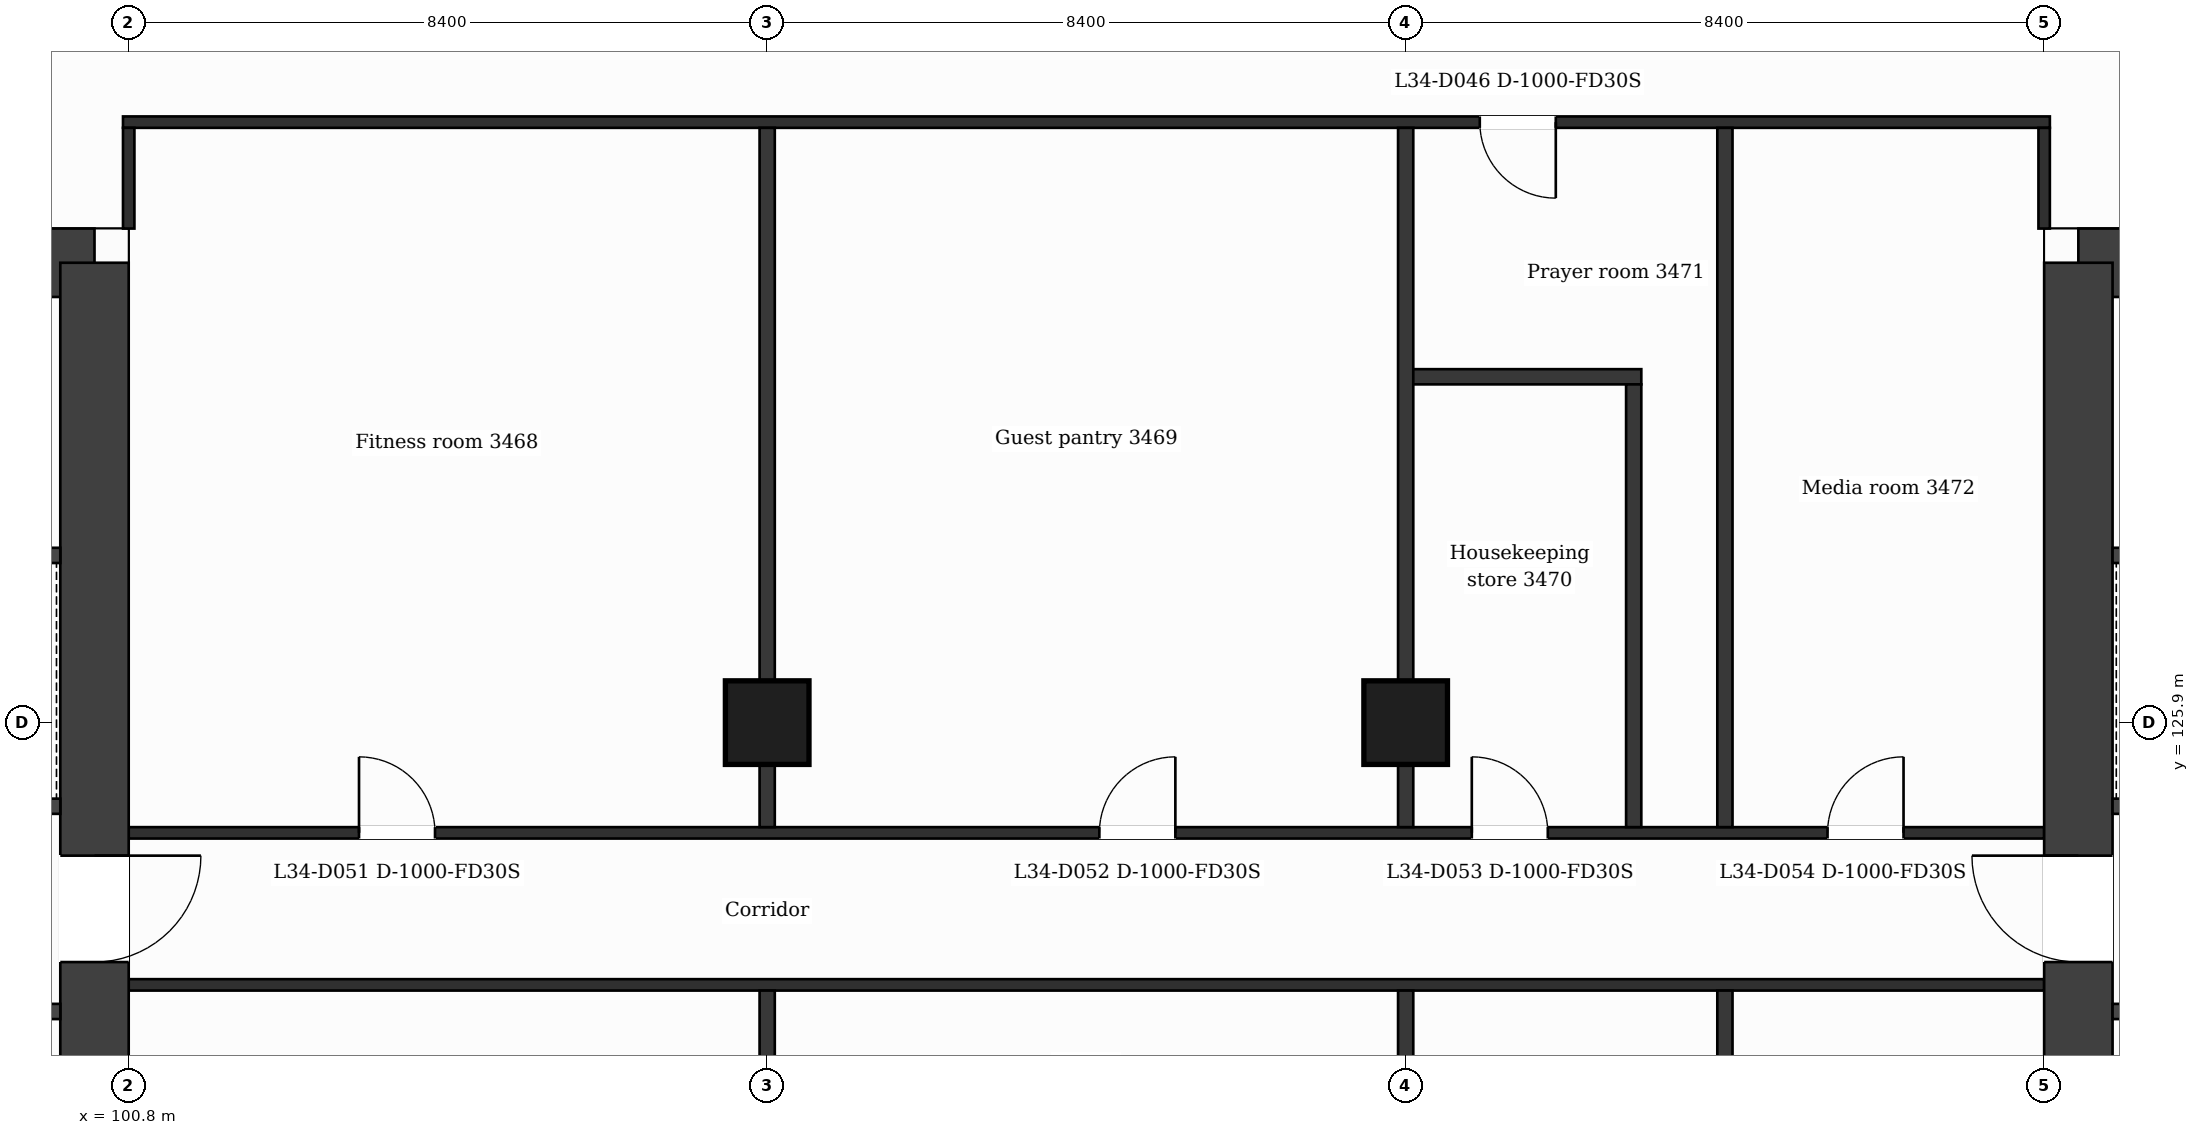
"""IFC4 building model, lengths in metres.
Left out: names, types, materials, properties, quantities, classifications, styles, units other than length and angle.
Written with IfcOpenShell. Run it as: python <this file> out.ifc"""

import sys

from ifc_helpers import new_model, si_unit, direction, frame, frame_2d, origin, origin_2d, place, context, subcontext, project, spatial, rectangle, extrude, element, fill, save


model = new_model("IFC4")
c1 = context("Model", 3, precision=1e-05, world=origin(), true_north=direction((0.0, 1.0)))
c2 = subcontext(c1, "Body", "Model", "MODEL_VIEW")
j1 = project(units=[si_unit("LENGTHUNIT", "METRE"), si_unit("PLANEANGLEUNIT", "RADIAN")], contexts=[c1])
p1 = place(None, origin())
s1 = spatial("IfcSite", under=j1, at=p1, CompositionType="ELEMENT")
p2 = place(p1, origin())
s2 = spatial("IfcBuilding", under=s1, at=p2, CompositionType="ELEMENT")
p3 = place(p2, frame((0.0, 0.0, 147.8)))
s3 = spatial("IfcBuildingStorey", under=s2, at=p3, CompositionType="ELEMENT", Elevation=147.8)
p4 = place(p3, frame((89.024, 131.95, 0.0), z_axis=(0.0, 0.0, 1.0), x_axis=(1.0, 0.0, 0.0)))
e1 = element("IfcWall", 1, at=p4, inside=s3, PredefinedType="SHEAR", context=c2, shape_type="SweptSolid", body=[
    extrude(rectangle(XDim=11.326, YDim=0.9, at=frame_2d((5.663, 0.0))), origin(), (0.0, 0.0, 1.0), 3.7),
])
p5 = place(p4, frame((6.739, 0.0, 0.0)))
e2 = element("IfcOpeningElement", 2, at=p5, cuts=e1, PredefinedType="OPENING", context=c2, shape_type="SweptSolid", body=[
    extrude(rectangle(XDim=1.2, YDim=2.1, at=frame_2d((0.6, 1.05))), frame((0.0, 0.46, 0.0), z_axis=(0.0, -1.0, 0.0), x_axis=(1.0, 0.0, 0.0)), (0.0, 0.0, 1.0), 0.92),
])
p6 = place(p3, frame((100.35, 131.95, 0.0), z_axis=(0.0, 0.0, 1.0), x_axis=(0.0, -1.0, 0.0)))
e3 = element("IfcWall", 3, at=p6, inside=s3, PredefinedType="SHEAR", context=c2, shape_type="SweptSolid", body=[
    extrude(rectangle(XDim=21.1, YDim=0.9, at=frame_2d((10.55, 0.0))), origin(), (0.0, 0.0, 1.0), 3.7),
])
p7 = place(p6, frame((7.8, 0.0, 0.0)))
e4 = element("IfcOpeningElement", 4, at=p7, cuts=e3, PredefinedType="OPENING", context=c2, shape_type="SweptSolid", body=[
    extrude(rectangle(XDim=1.4, YDim=2.1, at=frame_2d((0.7, 1.05))), frame((0.0, 0.46, 0.0), z_axis=(0.0, -1.0, 0.0), x_axis=(1.0, 0.0, 0.0)), (0.0, 0.0, 1.0), 0.92),
])
p8 = place(p3, frame((126.45, 131.95, 0.0), z_axis=(0.0, 0.0, 1.0), x_axis=(1.0, 0.0, 0.0)))
e5 = element("IfcWall", 5, at=p8, inside=s3, PredefinedType="SHEAR", context=c2, shape_type="SweptSolid", body=[
    extrude(rectangle(XDim=11.326, YDim=0.9, at=frame_2d((5.663, 0.0))), origin(), (0.0, 0.0, 1.0), 3.7),
])
p9 = place(p8, frame((3.386, 0.0, 0.0)))
e6 = element("IfcOpeningElement", 6, at=p9, cuts=e5, PredefinedType="OPENING", context=c2, shape_type="SweptSolid", body=[
    extrude(rectangle(XDim=1.2, YDim=2.1, at=frame_2d((0.6, 1.05))), frame((0.0, 0.46, 0.0), z_axis=(0.0, -1.0, 0.0), x_axis=(1.0, 0.0, 0.0)), (0.0, 0.0, 1.0), 0.92),
])
p10 = place(p3, frame((126.45, 110.85, 0.0), z_axis=(0.0, 0.0, 1.0), x_axis=(0.0, 1.0, 0.0)))
e7 = element("IfcWall", 7, at=p10, inside=s3, PredefinedType="SHEAR", context=c2, shape_type="SweptSolid", body=[
    extrude(rectangle(XDim=21.1, YDim=0.9, at=frame_2d((10.55, 0.0))), origin(), (0.0, 0.0, 1.0), 3.7),
])
p11 = place(p10, frame((11.9, 0.0, 0.0)))
e8 = element("IfcOpeningElement", 8, at=p11, cuts=e7, PredefinedType="OPENING", context=c2, shape_type="SweptSolid", body=[
    extrude(rectangle(XDim=1.4, YDim=2.1, at=frame_2d((0.7, 1.05))), frame((0.0, 0.46, 0.0), z_axis=(0.0, -1.0, 0.0), x_axis=(1.0, 0.0, 0.0)), (0.0, 0.0, 1.0), 0.92),
])
for number, where, z_axis, x_axis in (
    (9, (109.2, 125.9, 0.0), (0.0, 0.0, 1.0), (1.0, 0.0, 0.0)),
    (10, (117.6, 125.9, 0.0), (0.0, 0.0, 1.0), (1.0, 0.0, 0.0)),
):
    element("IfcColumn", number, at=place(p3, frame(where, z_axis=z_axis, x_axis=x_axis)), inside=s3, PredefinedType="COLUMN", context=c2, shape_type="SweptSolid", body=[
        extrude(rectangle(XDim=1.1, YDim=1.1, at=origin_2d()), origin(), (0.0, 0.0, 1.0), 3.7),
    ])
p12 = place(p3, frame((95.227, 122.1, 0.0), z_axis=(0.0, 0.0, 1.0), x_axis=(1.0, 0.0, 0.0)))
e11 = element("IfcWall", 11, at=p12, inside=s3, PredefinedType="PARTITIONING", context=c2, shape_type="SweptSolid", body=[
    extrude(rectangle(XDim=4.673, YDim=0.2, at=frame_2d((2.336, 0.0))), origin(), (0.0, 0.0, 1.0), 3.38),
])
p13 = place(p12, frame((0.718, 0.0, 0.0)))
e12 = element("IfcOpeningElement", 12, at=p13, cuts=e11, PredefinedType="OPENING", context=c2, shape_type="SweptSolid", body=[
    extrude(rectangle(XDim=0.9, YDim=2.1, at=frame_2d((0.45, 1.05))), frame((0.0, 0.11, 0.0), z_axis=(0.0, -1.0, 0.0), x_axis=(1.0, 0.0, 0.0)), (0.0, 0.0, 1.0), 0.22),
])
p14 = place(p12, frame((3.055, 0.0, 0.0)))
e13 = element("IfcOpeningElement", 13, at=p14, cuts=e11, PredefinedType="OPENING", context=c2, shape_type="SweptSolid", body=[
    extrude(rectangle(XDim=0.9, YDim=2.1, at=frame_2d((0.45, 1.05))), frame((0.0, 0.11, 0.0), z_axis=(0.0, -1.0, 0.0), x_axis=(1.0, 0.0, 0.0)), (0.0, 0.0, 1.0), 0.22),
])
p15 = place(p3, frame((126.9, 122.1, 0.0), z_axis=(0.0, 0.0, 1.0), x_axis=(1.0, 0.0, 0.0)))
e14 = element("IfcWall", 14, at=p15, inside=s3, PredefinedType="PARTITIONING", context=c2, shape_type="SweptSolid", body=[
    extrude(rectangle(XDim=4.673, YDim=0.2, at=frame_2d((2.336, 0.0))), origin(), (0.0, 0.0, 1.0), 3.38),
])
p16 = place(p15, frame((3.128, 0.0, 0.0)))
e15 = element("IfcOpeningElement", 15, at=p16, cuts=e14, PredefinedType="OPENING", context=c2, shape_type="SweptSolid", body=[
    extrude(rectangle(XDim=0.9, YDim=2.1, at=frame_2d((0.45, 1.05))), frame((0.0, 0.11, 0.0), z_axis=(0.0, -1.0, 0.0), x_axis=(1.0, 0.0, 0.0)), (0.0, 0.0, 1.0), 0.22),
])
p17 = place(p15, frame((0.902, 0.0, 0.0)))
e16 = element("IfcOpeningElement", 16, at=p17, cuts=e14, PredefinedType="OPENING", context=c2, shape_type="SweptSolid", body=[
    extrude(rectangle(XDim=0.9, YDim=2.1, at=frame_2d((0.45, 1.05))), frame((0.0, 0.11, 0.0), z_axis=(0.0, -1.0, 0.0), x_axis=(1.0, 0.0, 0.0)), (0.0, 0.0, 1.0), 0.22),
])
p18 = place(p3, frame((100.8, 122.45, 0.0), z_axis=(0.0, 0.0, 1.0), x_axis=(1.0, 0.0, 0.0)))
e17 = element("IfcWall", 17, at=p18, inside=s3, PredefinedType="PARTITIONING", context=c2, shape_type="SweptSolid", body=[
    extrude(rectangle(XDim=25.2, YDim=0.15, at=frame_2d((12.6, 0.0))), origin(), (0.0, 0.0, 1.0), 3.38),
])
p19 = place(p3, frame((100.8, 124.45, 0.0), z_axis=(0.0, 0.0, 1.0), x_axis=(1.0, 0.0, 0.0)))
e18 = element("IfcWall", 18, at=p19, inside=s3, PredefinedType="PARTITIONING", context=c2, shape_type="SweptSolid", body=[
    extrude(rectangle(XDim=25.2, YDim=0.15, at=frame_2d((12.6, 0.0))), origin(), (0.0, 0.0, 1.0), 3.38),
])
p20 = place(p19, frame((3.03, 0.0, 0.0)))
e19 = element("IfcOpeningElement", 19, at=p20, cuts=e18, PredefinedType="OPENING", context=c2, shape_type="SweptSolid", body=[
    extrude(rectangle(XDim=1.0, YDim=2.1, at=frame_2d((0.5, 1.05))), frame((0.0, 0.085, 0.0), z_axis=(0.0, -1.0, 0.0), x_axis=(1.0, 0.0, 0.0)), (0.0, 0.0, 1.0), 0.17),
])
p21 = place(p19, frame((12.77, 0.0, 0.0)))
e20 = element("IfcOpeningElement", 20, at=p21, cuts=e18, PredefinedType="OPENING", context=c2, shape_type="SweptSolid", body=[
    extrude(rectangle(XDim=1.0, YDim=2.1, at=frame_2d((0.5, 1.05))), frame((0.0, 0.085, 0.0), z_axis=(0.0, -1.0, 0.0), x_axis=(1.0, 0.0, 0.0)), (0.0, 0.0, 1.0), 0.17),
])
p22 = place(p19, frame((17.67, 0.0, 0.0)))
e21 = element("IfcOpeningElement", 21, at=p22, cuts=e18, PredefinedType="OPENING", context=c2, shape_type="SweptSolid", body=[
    extrude(rectangle(XDim=1.0, YDim=2.1, at=frame_2d((0.5, 1.05))), frame((0.0, 0.085, 0.0), z_axis=(0.0, -1.0, 0.0), x_axis=(1.0, 0.0, 0.0)), (0.0, 0.0, 1.0), 0.17),
])
p23 = place(p19, frame((22.35, 0.0, 0.0)))
e22 = element("IfcOpeningElement", 22, at=p23, cuts=e18, PredefinedType="OPENING", context=c2, shape_type="SweptSolid", body=[
    extrude(rectangle(XDim=1.0, YDim=2.1, at=frame_2d((0.5, 1.05))), frame((0.0, 0.085, 0.0), z_axis=(0.0, -1.0, 0.0), x_axis=(1.0, 0.0, 0.0)), (0.0, 0.0, 1.0), 0.17),
])
p24 = place(p3, frame((92.702, 124.8, 0.0), z_axis=(0.0, 0.0, 1.0), x_axis=(1.0, 0.0, 0.0)))
e23 = element("IfcWall", 23, at=p24, inside=s3, PredefinedType="PARTITIONING", context=c2, shape_type="SweptSolid", body=[
    extrude(rectangle(XDim=7.198, YDim=0.2, at=frame_2d((3.599, 0.0))), origin(), (0.0, 0.0, 1.0), 3.38),
])
p25 = place(p24, frame((5.609, 0.0, 0.0)))
e24 = element("IfcOpeningElement", 24, at=p25, cuts=e23, PredefinedType="OPENING", context=c2, shape_type="SweptSolid", body=[
    extrude(rectangle(XDim=1.1, YDim=2.1, at=frame_2d((0.55, 1.05))), frame((0.0, 0.11, 0.0), z_axis=(0.0, -1.0, 0.0), x_axis=(1.0, 0.0, 0.0)), (0.0, 0.0, 1.0), 0.22),
])
p26 = place(p3, frame((126.9, 124.8, 0.0), z_axis=(0.0, 0.0, 1.0), x_axis=(1.0, 0.0, 0.0)))
e25 = element("IfcWall", 25, at=p26, inside=s3, PredefinedType="PARTITIONING", context=c2, shape_type="SweptSolid", body=[
    extrude(rectangle(XDim=4.715, YDim=0.2, at=frame_2d((2.358, 0.0))), origin(), (0.0, 0.0, 1.0), 3.38),
])
p27 = place(p26, frame((0.768, 0.0, 0.0)))
e26 = element("IfcOpeningElement", 26, at=p27, cuts=e25, PredefinedType="OPENING", context=c2, shape_type="SweptSolid", body=[
    extrude(rectangle(XDim=1.1, YDim=2.1, at=frame_2d((0.55, 1.05))), frame((0.0, 0.11, 0.0), z_axis=(0.0, -1.0, 0.0), x_axis=(1.0, 0.0, 0.0)), (0.0, 0.0, 1.0), 0.22),
])
p28 = place(p3, frame((92.827, 128.1, 0.0), z_axis=(0.0, 0.0, 1.0), x_axis=(1.0, 0.0, 0.0)))
e27 = element("IfcWall", 27, at=p28, inside=s3, PredefinedType="PARTITIONING", context=c2, shape_type="SweptSolid", body=[
    extrude(rectangle(XDim=7.073, YDim=0.2, at=frame_2d((3.537, 0.0))), origin(), (0.0, 0.0, 1.0), 3.38),
])
p29 = place(p28, frame((3.042, 0.0, 0.0)))
e28 = element("IfcOpeningElement", 28, at=p29, cuts=e27, PredefinedType="OPENING", context=c2, shape_type="SweptSolid", body=[
    extrude(rectangle(XDim=1.1, YDim=2.1, at=frame_2d((0.55, 1.05))), frame((0.0, 0.11, 0.0), z_axis=(0.0, -1.0, 0.0), x_axis=(1.0, 0.0, 0.0)), (0.0, 0.0, 1.0), 0.22),
])
p30 = place(p3, frame((126.9, 128.1, 0.0), z_axis=(0.0, 0.0, 1.0), x_axis=(1.0, 0.0, 0.0)))
e29 = element("IfcWall", 29, at=p30, inside=s3, PredefinedType="PARTITIONING", context=c2, shape_type="SweptSolid", body=[
    extrude(rectangle(XDim=4.715, YDim=0.2, at=frame_2d((2.358, 0.0))), origin(), (0.0, 0.0, 1.0), 3.38),
])
p31 = place(p30, frame((3.126, 0.0, 0.0)))
e30 = element("IfcOpeningElement", 30, at=p31, cuts=e29, PredefinedType="OPENING", context=c2, shape_type="SweptSolid", body=[
    extrude(rectangle(XDim=1.1, YDim=2.1, at=frame_2d((0.55, 1.05))), frame((0.0, 0.11, 0.0), z_axis=(0.0, -1.0, 0.0), x_axis=(1.0, 0.0, 0.0)), (0.0, 0.0, 1.0), 0.22),
])
p32 = place(p3, frame((117.6, 130.45, 0.0), z_axis=(0.0, 0.0, 1.0), x_axis=(1.0, 0.0, 0.0)))
e31 = element("IfcWall", 31, at=p32, inside=s3, PredefinedType="PARTITIONING", context=c2, shape_type="SweptSolid", body=[
    extrude(rectangle(XDim=3.1, YDim=0.2, at=frame_2d((1.55, 0.0))), origin(), (0.0, 0.0, 1.0), 3.38),
])
p33 = place(p3, frame((100.725, 133.8, 0.0), z_axis=(0.0, 0.0, 1.0), x_axis=(1.0, 0.0, 0.0)))
e32 = element("IfcWall", 32, at=p33, inside=s3, PredefinedType="PARTITIONING", context=c2, shape_type="SweptSolid", body=[
    extrude(rectangle(XDim=25.35, YDim=0.15, at=frame_2d((12.675, 0.0))), origin(), (0.0, 0.0, 1.0), 3.38),
])
p34 = place(p33, frame((17.85, 0.0, 0.0)))
e33 = element("IfcOpeningElement", 33, at=p34, cuts=e32, PredefinedType="OPENING", context=c2, shape_type="SweptSolid", body=[
    extrude(rectangle(XDim=1.0, YDim=2.1, at=frame_2d((0.5, 1.05))), frame((0.0, 0.085, 0.0), z_axis=(0.0, -1.0, 0.0), x_axis=(1.0, 0.0, 0.0)), (0.0, 0.0, 1.0), 0.17),
])
p35 = place(p3, frame((100.8, 132.4, 0.0), z_axis=(0.0, 0.0, 1.0), x_axis=(0.0, 1.0, 0.0)))
e34 = element("IfcWall", 34, at=p35, inside=s3, PredefinedType="PARTITIONING", context=c2, shape_type="SweptSolid", body=[
    extrude(rectangle(XDim=1.325, YDim=0.15, at=frame_2d((0.663, 0.0))), origin(), (0.0, 0.0, 1.0), 3.38),
])
p36 = place(p3, frame((109.2, 109.075, 0.0), z_axis=(0.0, 0.0, 1.0), x_axis=(0.0, 1.0, 0.0)))
e35 = element("IfcWall", 35, at=p36, inside=s3, PredefinedType="PARTITIONING", context=c2, shape_type="SweptSolid", body=[
    extrude(rectangle(XDim=13.3, YDim=0.2, at=frame_2d((6.65, 0.0))), origin(), (0.0, 0.0, 1.0), 3.38),
])
p37 = place(p3, frame((109.2, 124.525, 0.0), z_axis=(0.0, 0.0, 1.0), x_axis=(0.0, 1.0, 0.0)))
e36 = element("IfcWall", 36, at=p37, inside=s3, PredefinedType="PARTITIONING", context=c2, shape_type="SweptSolid", body=[
    extrude(rectangle(XDim=9.2, YDim=0.2, at=frame_2d((4.6, 0.0))), origin(), (0.0, 0.0, 1.0), 3.38),
])
p38 = place(p3, frame((117.6, 109.075, 0.0), z_axis=(0.0, 0.0, 1.0), x_axis=(0.0, 1.0, 0.0)))
e37 = element("IfcWall", 37, at=p38, inside=s3, PredefinedType="PARTITIONING", context=c2, shape_type="SweptSolid", body=[
    extrude(rectangle(XDim=13.3, YDim=0.2, at=frame_2d((6.65, 0.0))), origin(), (0.0, 0.0, 1.0), 3.38),
])
p39 = place(p3, frame((117.6, 124.525, 0.0), z_axis=(0.0, 0.0, 1.0), x_axis=(0.0, 1.0, 0.0)))
e38 = element("IfcWall", 38, at=p39, inside=s3, PredefinedType="PARTITIONING", context=c2, shape_type="SweptSolid", body=[
    extrude(rectangle(XDim=9.2, YDim=0.2, at=frame_2d((4.6, 0.0))), origin(), (0.0, 0.0, 1.0), 3.38),
])
p40 = place(p3, frame((120.6, 124.525, 0.0), z_axis=(0.0, 0.0, 1.0), x_axis=(0.0, 1.0, 0.0)))
e39 = element("IfcWall", 39, at=p40, inside=s3, PredefinedType="PARTITIONING", context=c2, shape_type="SweptSolid", body=[
    extrude(rectangle(XDim=5.825, YDim=0.2, at=frame_2d((2.913, 0.0))), origin(), (0.0, 0.0, 1.0), 3.38),
])
p41 = place(p3, frame((121.8, 109.075, 0.0), z_axis=(0.0, 0.0, 1.0), x_axis=(0.0, 1.0, 0.0)))
e40 = element("IfcWall", 40, at=p41, inside=s3, PredefinedType="PARTITIONING", context=c2, shape_type="SweptSolid", body=[
    extrude(rectangle(XDim=13.3, YDim=0.2, at=frame_2d((6.65, 0.0))), origin(), (0.0, 0.0, 1.0), 3.38),
])
p42 = place(p3, frame((121.8, 124.525, 0.0), z_axis=(0.0, 0.0, 1.0), x_axis=(0.0, 1.0, 0.0)))
e41 = element("IfcWall", 41, at=p42, inside=s3, PredefinedType="PARTITIONING", context=c2, shape_type="SweptSolid", body=[
    extrude(rectangle(XDim=9.2, YDim=0.2, at=frame_2d((4.6, 0.0))), origin(), (0.0, 0.0, 1.0), 3.38),
])
p43 = place(p3, frame((126.0, 132.4, 0.0), z_axis=(0.0, 0.0, 1.0), x_axis=(0.0, 1.0, 0.0)))
e42 = element("IfcWall", 42, at=p43, inside=s3, PredefinedType="PARTITIONING", context=c2, shape_type="SweptSolid", body=[
    extrude(rectangle(XDim=1.325, YDim=0.15, at=frame_2d((0.663, 0.0))), origin(), (0.0, 0.0, 1.0), 3.38),
])
p44 = place(p34, origin())
e43 = element("IfcDoor", 43, at=p44, inside=s3, OperationType="SINGLE_SWING_RIGHT", PredefinedType="DOOR", context=c2, shape_type="SweptSolid", body=[
    extrude(rectangle(XDim=1.0, YDim=2.1, at=frame_2d((0.5, 1.05))), frame((0.0, 0.025, 0.0), z_axis=(0.0, -1.0, 0.0), x_axis=(1.0, 0.0, 0.0)), (0.0, 0.0, 1.0), 0.05),
])
fill(e33, e43)
p45 = place(p20, origin())
e44 = element("IfcDoor", 44, at=p45, inside=s3, OperationType="SINGLE_SWING_LEFT", PredefinedType="DOOR", context=c2, shape_type="SweptSolid", body=[
    extrude(rectangle(XDim=1.0, YDim=2.1, at=frame_2d((0.5, 1.05))), frame((0.0, 0.025, 0.0), z_axis=(0.0, -1.0, 0.0), x_axis=(1.0, 0.0, 0.0)), (0.0, 0.0, 1.0), 0.05),
])
fill(e19, e44)
p46 = place(p21, origin())
e45 = element("IfcDoor", 45, at=p46, inside=s3, OperationType="SINGLE_SWING_RIGHT", PredefinedType="DOOR", context=c2, shape_type="SweptSolid", body=[
    extrude(rectangle(XDim=1.0, YDim=2.1, at=frame_2d((0.5, 1.05))), frame((0.0, 0.025, 0.0), z_axis=(0.0, -1.0, 0.0), x_axis=(1.0, 0.0, 0.0)), (0.0, 0.0, 1.0), 0.05),
])
fill(e20, e45)
p47 = place(p22, origin())
e46 = element("IfcDoor", 46, at=p47, inside=s3, OperationType="SINGLE_SWING_LEFT", PredefinedType="DOOR", context=c2, shape_type="SweptSolid", body=[
    extrude(rectangle(XDim=1.0, YDim=2.1, at=frame_2d((0.5, 1.05))), frame((0.0, 0.025, 0.0), z_axis=(0.0, -1.0, 0.0), x_axis=(1.0, 0.0, 0.0)), (0.0, 0.0, 1.0), 0.05),
])
fill(e21, e46)
p48 = place(p23, origin())
e47 = element("IfcDoor", 47, at=p48, inside=s3, OperationType="SINGLE_SWING_RIGHT", PredefinedType="DOOR", context=c2, shape_type="SweptSolid", body=[
    extrude(rectangle(XDim=1.0, YDim=2.1, at=frame_2d((0.5, 1.05))), frame((0.0, 0.025, 0.0), z_axis=(0.0, -1.0, 0.0), x_axis=(1.0, 0.0, 0.0)), (0.0, 0.0, 1.0), 0.05),
])
fill(e22, e47)
p49 = place(p7, origin())
e48 = element("IfcDoor", 48, at=p49, inside=s3, OperationType="SINGLE_SWING_LEFT", PredefinedType="DOOR", context=c2, shape_type="SweptSolid", body=[
    extrude(rectangle(XDim=1.4, YDim=2.1, at=frame_2d((0.7, 1.05))), frame((0.0, 0.025, 0.0), z_axis=(0.0, -1.0, 0.0), x_axis=(1.0, 0.0, 0.0)), (0.0, 0.0, 1.0), 0.05),
])
fill(e4, e48)
p50 = place(p11, origin())
e49 = element("IfcDoor", 49, at=p50, inside=s3, OperationType="SINGLE_SWING_RIGHT", PredefinedType="DOOR", context=c2, shape_type="SweptSolid", body=[
    extrude(rectangle(XDim=1.4, YDim=2.1, at=frame_2d((0.7, 1.05))), frame((0.0, 0.025, 0.0), z_axis=(0.0, -1.0, 0.0), x_axis=(1.0, 0.0, 0.0)), (0.0, 0.0, 1.0), 0.05),
])
fill(e8, e49)
save(model, sys.argv[1])
